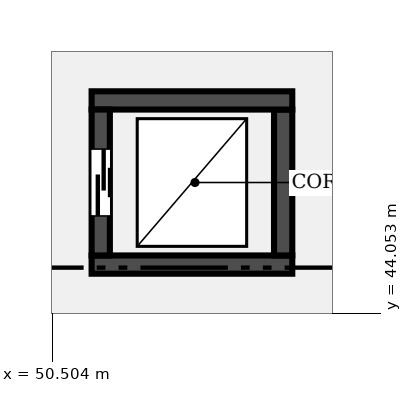
"""IFC4 building model, lengths in metres.
Left out: names, types, materials, properties, quantities, classifications, styles, units other than length and angle.
Written with IfcOpenShell. Run it as: python <this file> out.ifc"""

import sys

from ifc_helpers import new_model, si_unit, direction, frame, frame_2d, origin, place, context, subcontext, project, spatial, rectangle, extrude, element, fill, save


model = new_model("IFC4")
c1 = context("Model", 3, precision=1e-05, world=origin(), true_north=direction((0.0, 1.0)))
c2 = subcontext(c1, "Body", "Model", "MODEL_VIEW")
j1 = project(units=[si_unit("LENGTHUNIT", "METRE"), si_unit("PLANEANGLEUNIT", "RADIAN")], contexts=[c1])
p1 = place(None, origin())
s1 = spatial("IfcSite", under=j1, at=p1, CompositionType="ELEMENT")
p2 = place(p1, origin())
s2 = spatial("IfcBuilding", under=s1, at=p2, CompositionType="ELEMENT")
p3 = place(p2, origin())
s3 = spatial("IfcBuildingStorey", under=s2, at=p3, CompositionType="ELEMENT", Elevation=0.0)
p4 = place(p3, frame((51.15, 44.85, 0.0), z_axis=(0.0, 0.0, 1.0), x_axis=(1.0, 0.0, 0.0)))
e1 = element("IfcWall", 1, at=p4, inside=s3, PredefinedType="SHEAR", context=c2, shape_type="SweptSolid", body=[
    extrude(rectangle(XDim=3.3, YDim=0.3, at=frame_2d((1.65, 0.0))), origin(), (0.0, 0.0, 1.0), 5.1),
])
p5 = place(p3, frame((54.3, 45.0, 0.0), z_axis=(0.0, 0.0, 1.0), x_axis=(0.0, 1.0, 0.0)))
e2 = element("IfcWall", 2, at=p5, inside=s3, PredefinedType="SHEAR", context=c2, shape_type="SweptSolid", body=[
    extrude(rectangle(XDim=2.4, YDim=0.3, at=frame_2d((1.2, 0.0))), origin(), (0.0, 0.0, 1.0), 5.1),
])
p6 = place(p3, frame((54.45, 47.55, 0.0), z_axis=(0.0, 0.0, 1.0), x_axis=(-1.0, 0.0, 0.0)))
e3 = element("IfcWall", 3, at=p6, inside=s3, PredefinedType="SHEAR", context=c2, shape_type="SweptSolid", body=[
    extrude(rectangle(XDim=3.3, YDim=0.3, at=frame_2d((1.65, 0.0))), origin(), (0.0, 0.0, 1.0), 5.1),
])
p7 = place(p3, frame((51.3, 47.4, 0.0), z_axis=(0.0, 0.0, 1.0), x_axis=(0.0, -1.0, 0.0)))
e4 = element("IfcWall", 4, at=p7, inside=s3, PredefinedType="SHEAR", context=c2, shape_type="SweptSolid", body=[
    extrude(rectangle(XDim=2.4, YDim=0.3, at=frame_2d((1.2, 0.0))), origin(), (0.0, 0.0, 1.0), 5.1),
])
p8 = place(p7, frame((0.65, 0.0, 0.0)))
e5 = element("IfcOpeningElement", 5, at=p8, cuts=e4, PredefinedType="OPENING", context=c2, shape_type="SweptSolid", body=[
    extrude(rectangle(XDim=1.1, YDim=2.2, at=frame_2d((0.55, 1.1))), frame((0.0, 0.16, 0.0), z_axis=(0.0, -1.0, 0.0), x_axis=(1.0, 0.0, 0.0)), (0.0, 0.0, 1.0), 0.32),
])
p9 = place(p8, origin())
e6 = element("IfcDoor", 6, at=p9, inside=s3, OperationType="SLIDING_TO_LEFT", PredefinedType="DOOR", context=c2, shape_type="SweptSolid", body=[
    extrude(rectangle(XDim=1.1, YDim=2.2, at=frame_2d((0.55, 1.1))), frame((0.0, 0.025, 0.0), z_axis=(0.0, -1.0, 0.0), x_axis=(1.0, 0.0, 0.0)), (0.0, 0.0, 1.0), 0.05),
])
fill(e5, e6)
save(model, sys.argv[1])
